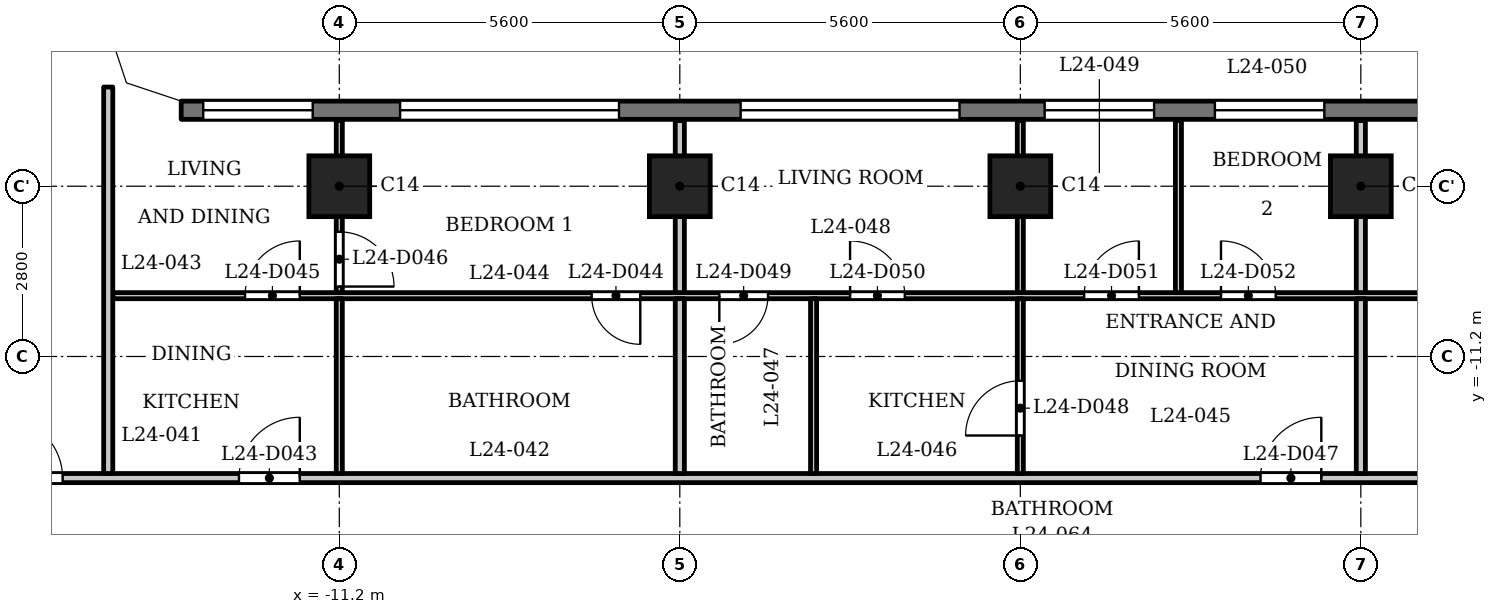
"""IFC4 building model, lengths in metres.
Left out: names, types, materials, properties, quantities, classifications, styles, units other than length and angle.
Written with IfcOpenShell. Run it as: python <this file> out.ifc"""

import sys

from ifc_helpers import new_model, si_unit, direction, frame, frame_2d, origin, origin_2d, place, context, subcontext, project, spatial, polyline, rectangle, outline, extrude, element, fill, save


model = new_model("IFC4")
c1 = context("Model", 3, precision=1e-05, world=origin(), true_north=direction((0.0, 1.0)))
c2 = subcontext(c1, "Body", "Model", "MODEL_VIEW")
j1 = project(units=[si_unit("LENGTHUNIT", "METRE"), si_unit("PLANEANGLEUNIT", "RADIAN")], contexts=[c1])
p1 = place(None, origin())
s1 = spatial("IfcSite", under=j1, at=p1, CompositionType="ELEMENT")
p2 = place(p1, origin())
s2 = spatial("IfcBuilding", under=s1, at=p2, CompositionType="ELEMENT")
p3 = place(p2, frame((0.0, 0.0, 97.3)))
s3 = spatial("IfcBuildingStorey", under=s2, at=p3, CompositionType="ELEMENT", Elevation=97.3)
for number, where, z_axis, x_axis in (
    (1, (-11.2, -8.4, 0.0), (0.0, 0.0, 1.0), (1.0, 0.0, 0.0)),
    (2, (-5.6, -8.4, 0.0), (0.0, 0.0, 1.0), (1.0, 0.0, 0.0)),
    (3, (0.0, -8.4, 0.0), (0.0, 0.0, 1.0), (1.0, 0.0, 0.0)),
    (4, (5.6, -8.4, 0.0), (0.0, 0.0, 1.0), (1.0, 0.0, 0.0)),
):
    element("IfcColumn", number, at=place(p3, frame(where, z_axis=z_axis, x_axis=x_axis)), inside=s3, PredefinedType="COLUMN", context=c2, shape_type="SweptSolid", body=[
        extrude(rectangle(XDim=1.0, YDim=1.0, at=origin_2d()), origin(), (0.0, 0.0, 1.0), 3.5),
    ])
p4 = place(p3, frame((13.8, -7.15, 0.0), z_axis=(0.0, 0.0, 1.0), x_axis=(-1.0, 0.0, 0.0)))
e5 = element("IfcWall", 5, at=p4, inside=s3, PredefinedType="SOLIDWALL", context=c2, shape_type="SweptSolid", body=[
    extrude(rectangle(XDim=27.6, YDim=0.3, at=frame_2d((13.8, 0.0))), origin(), (0.0, 0.0, 1.0), 3.2),
])
p5 = place(p4, frame((0.363, 0.0, 0.9)))
e6 = element("IfcOpeningElement", 6, at=p5, cuts=e5, PredefinedType="OPENING", context=c2, shape_type="SweptSolid", body=[
    extrude(rectangle(XDim=1.8, YDim=1.25, at=frame_2d((0.9, 0.625))), frame((0.0, 0.16, 0.0), z_axis=(0.0, -1.0, 0.0), x_axis=(1.0, 0.0, 0.0)), (0.0, 0.0, 1.0), 0.32),
])
p6 = place(p4, frame((3.6, 0.0, 1.2)))
e7 = element("IfcOpeningElement", 7, at=p6, cuts=e5, PredefinedType="OPENING", context=c2, shape_type="SweptSolid", body=[
    extrude(rectangle(XDim=3.6, YDim=0.95, at=frame_2d((1.8, 0.475))), frame((0.0, 0.16, 0.0), z_axis=(0.0, -1.0, 0.0), x_axis=(1.0, 0.0, 0.0)), (0.0, 0.0, 1.0), 0.32),
])
p7 = place(p4, frame((8.8, 0.0, 0.9)))
e8 = element("IfcOpeningElement", 8, at=p7, cuts=e5, PredefinedType="OPENING", context=c2, shape_type="SweptSolid", body=[
    extrude(rectangle(XDim=1.8, YDim=1.25, at=frame_2d((0.9, 0.625))), frame((0.0, 0.16, 0.0), z_axis=(0.0, -1.0, 0.0), x_axis=(1.0, 0.0, 0.0)), (0.0, 0.0, 1.0), 0.32),
])
p8 = place(p4, frame((11.6, 0.0, 0.9)))
e9 = element("IfcOpeningElement", 9, at=p8, cuts=e5, PredefinedType="OPENING", context=c2, shape_type="SweptSolid", body=[
    extrude(rectangle(XDim=1.8, YDim=1.25, at=frame_2d((0.9, 0.625))), frame((0.0, 0.16, 0.0), z_axis=(0.0, -1.0, 0.0), x_axis=(1.0, 0.0, 0.0)), (0.0, 0.0, 1.0), 0.32),
])
p9 = place(p4, frame((14.8, 0.0, 1.2)))
e10 = element("IfcOpeningElement", 10, at=p9, cuts=e5, PredefinedType="OPENING", context=c2, shape_type="SweptSolid", body=[
    extrude(rectangle(XDim=3.6, YDim=0.95, at=frame_2d((1.8, 0.475))), frame((0.0, 0.16, 0.0), z_axis=(0.0, -1.0, 0.0), x_axis=(1.0, 0.0, 0.0)), (0.0, 0.0, 1.0), 0.32),
])
p10 = place(p4, frame((20.4, 0.0, 1.2)))
e11 = element("IfcOpeningElement", 11, at=p10, cuts=e5, PredefinedType="OPENING", context=c2, shape_type="SweptSolid", body=[
    extrude(rectangle(XDim=3.6, YDim=0.95, at=frame_2d((1.8, 0.475))), frame((0.0, 0.16, 0.0), z_axis=(0.0, -1.0, 0.0), x_axis=(1.0, 0.0, 0.0)), (0.0, 0.0, 1.0), 0.32),
])
p11 = place(p4, frame((25.438, 0.0, 0.9)))
e12 = element("IfcOpeningElement", 12, at=p11, cuts=e5, PredefinedType="OPENING", context=c2, shape_type="SweptSolid", body=[
    extrude(rectangle(XDim=1.8, YDim=1.25, at=frame_2d((0.9, 0.625))), frame((0.0, 0.16, 0.0), z_axis=(0.0, -1.0, 0.0), x_axis=(1.0, 0.0, 0.0)), (0.0, 0.0, 1.0), 0.32),
])
p12 = place(p3, frame((-17.4, -13.2, 0.0), z_axis=(0.0, 0.0, 1.0), x_axis=(1.0, 0.0, 0.0)))
e13 = element("IfcWall", 13, at=p12, inside=s3, PredefinedType="PARTITIONING", context=c2, shape_type="SweptSolid", body=[
    extrude(rectangle(XDim=34.8, YDim=0.15, at=frame_2d((17.4, 0.0))), origin(), (0.0, 0.0, 1.0), 3.2),
])
p13 = place(p12, frame((0.65, 0.0, 0.0)))
e14 = element("IfcOpeningElement", 14, at=p13, cuts=e13, PredefinedType="OPENING", context=c2, shape_type="SweptSolid", body=[
    extrude(rectangle(XDim=1.0, YDim=2.1, at=frame_2d((0.5, 1.05))), frame((0.0, 0.085, 0.0), z_axis=(0.0, -1.0, 0.0), x_axis=(1.0, 0.0, 0.0)), (0.0, 0.0, 1.0), 0.17),
])
p14 = place(p12, frame((33.05, 0.0, 0.0)))
e15 = element("IfcOpeningElement", 15, at=p14, cuts=e13, PredefinedType="OPENING", context=c2, shape_type="SweptSolid", body=[
    extrude(rectangle(XDim=1.0, YDim=2.1, at=frame_2d((0.5, 1.05))), frame((0.0, 0.085, 0.0), z_axis=(0.0, -1.0, 0.0), x_axis=(1.0, 0.0, 0.0)), (0.0, 0.0, 1.0), 0.17),
])
p15 = place(p12, frame((4.55, 0.0, 0.0)))
e16 = element("IfcOpeningElement", 16, at=p15, cuts=e13, PredefinedType="OPENING", context=c2, shape_type="SweptSolid", body=[
    extrude(rectangle(XDim=1.0, YDim=2.1, at=frame_2d((0.5, 1.05))), frame((0.0, 0.085, 0.0), z_axis=(0.0, -1.0, 0.0), x_axis=(1.0, 0.0, 0.0)), (0.0, 0.0, 1.0), 0.17),
])
p16 = place(p12, frame((21.35, 0.0, 0.0)))
e17 = element("IfcOpeningElement", 17, at=p16, cuts=e13, PredefinedType="OPENING", context=c2, shape_type="SweptSolid", body=[
    extrude(rectangle(XDim=1.0, YDim=2.1, at=frame_2d((0.5, 1.05))), frame((0.0, 0.085, 0.0), z_axis=(0.0, -1.0, 0.0), x_axis=(1.0, 0.0, 0.0)), (0.0, 0.0, 1.0), 0.17),
])
p17 = place(p12, frame((30.75, 0.0, 0.0)))
e18 = element("IfcOpeningElement", 18, at=p17, cuts=e13, PredefinedType="OPENING", context=c2, shape_type="SweptSolid", body=[
    extrude(rectangle(XDim=1.0, YDim=2.1, at=frame_2d((0.5, 1.05))), frame((0.0, 0.085, 0.0), z_axis=(0.0, -1.0, 0.0), x_axis=(1.0, 0.0, 0.0)), (0.0, 0.0, 1.0), 0.17),
])
p18 = place(p3, frame((-14.925, -10.2, 0.0), z_axis=(0.0, 0.0, 1.0), x_axis=(1.0, 0.0, 0.0)))
e19 = element("IfcWall", 19, at=p18, inside=s3, PredefinedType="PARTITIONING", context=c2, shape_type="SweptSolid", body=[
    extrude(rectangle(XDim=29.85, YDim=0.1, at=frame_2d((14.925, 0.0))), origin(), (0.0, 0.0, 1.0), 3.2),
])
p19 = place(p18, frame((7.875, 0.0, 0.0)))
e20 = element("IfcOpeningElement", 20, at=p19, cuts=e19, PredefinedType="OPENING", context=c2, shape_type="SweptSolid", body=[
    extrude(rectangle(XDim=0.8, YDim=2.1, at=frame_2d((0.4, 1.05))), frame((0.0, 0.06, 0.0), z_axis=(0.0, -1.0, 0.0), x_axis=(1.0, 0.0, 0.0)), (0.0, 0.0, 1.0), 0.12),
])
p20 = place(p18, frame((2.175, 0.0, 0.0)))
e21 = element("IfcOpeningElement", 21, at=p20, cuts=e19, PredefinedType="OPENING", context=c2, shape_type="SweptSolid", body=[
    extrude(rectangle(XDim=0.9, YDim=2.1, at=frame_2d((0.45, 1.05))), frame((0.0, 0.06, 0.0), z_axis=(0.0, -1.0, 0.0), x_axis=(1.0, 0.0, 0.0)), (0.0, 0.0, 1.0), 0.12),
])
p21 = place(p18, frame((9.975, 0.0, 0.0)))
e22 = element("IfcOpeningElement", 22, at=p21, cuts=e19, PredefinedType="OPENING", context=c2, shape_type="SweptSolid", body=[
    extrude(rectangle(XDim=0.8, YDim=2.1, at=frame_2d((0.4, 1.05))), frame((0.0, 0.06, 0.0), z_axis=(0.0, -1.0, 0.0), x_axis=(1.0, 0.0, 0.0)), (0.0, 0.0, 1.0), 0.12),
])
p22 = place(p18, frame((12.125, 0.0, 0.0)))
e23 = element("IfcOpeningElement", 23, at=p22, cuts=e19, PredefinedType="OPENING", context=c2, shape_type="SweptSolid", body=[
    extrude(rectangle(XDim=0.9, YDim=2.1, at=frame_2d((0.45, 1.05))), frame((0.0, 0.06, 0.0), z_axis=(0.0, -1.0, 0.0), x_axis=(1.0, 0.0, 0.0)), (0.0, 0.0, 1.0), 0.12),
])
p23 = place(p18, frame((15.975, 0.0, 0.0)))
e24 = element("IfcOpeningElement", 24, at=p23, cuts=e19, PredefinedType="OPENING", context=c2, shape_type="SweptSolid", body=[
    extrude(rectangle(XDim=0.9, YDim=2.1, at=frame_2d((0.45, 1.05))), frame((0.0, 0.06, 0.0), z_axis=(0.0, -1.0, 0.0), x_axis=(1.0, 0.0, 0.0)), (0.0, 0.0, 1.0), 0.12),
])
p24 = place(p18, frame((18.225, 0.0, 0.0)))
e25 = element("IfcOpeningElement", 25, at=p24, cuts=e19, PredefinedType="OPENING", context=c2, shape_type="SweptSolid", body=[
    extrude(rectangle(XDim=0.9, YDim=2.1, at=frame_2d((0.45, 1.05))), frame((0.0, 0.06, 0.0), z_axis=(0.0, -1.0, 0.0), x_axis=(1.0, 0.0, 0.0)), (0.0, 0.0, 1.0), 0.12),
])
p25 = place(p18, frame((24.675, 0.0, 0.0)))
e26 = element("IfcOpeningElement", 26, at=p25, cuts=e19, PredefinedType="OPENING", context=c2, shape_type="SweptSolid", body=[
    extrude(rectangle(XDim=0.8, YDim=2.1, at=frame_2d((0.4, 1.05))), frame((0.0, 0.06, 0.0), z_axis=(0.0, -1.0, 0.0), x_axis=(1.0, 0.0, 0.0)), (0.0, 0.0, 1.0), 0.12),
])
p26 = place(p18, frame((28.375, 0.0, 0.0)))
e27 = element("IfcOpeningElement", 27, at=p26, cuts=e19, PredefinedType="OPENING", context=c2, shape_type="SweptSolid", body=[
    extrude(rectangle(XDim=0.9, YDim=2.1, at=frame_2d((0.45, 1.05))), frame((0.0, 0.06, 0.0), z_axis=(0.0, -1.0, 0.0), x_axis=(1.0, 0.0, 0.0)), (0.0, 0.0, 1.0), 0.12),
])
p27 = place(p3, frame((-15.0, -13.125, 0.0), z_axis=(0.0, 0.0, 1.0), x_axis=(0.0, 1.0, 0.0)))
e28 = element("IfcWall", 28, at=p27, inside=s3, PredefinedType="PARTITIONING", context=c2, shape_type="SweptSolid", body=[
    extrude(rectangle(XDim=6.356, YDim=0.15, at=frame_2d((3.178, 0.0))), origin(), (0.0, 0.0, 1.0), 3.2),
])
p28 = place(p3, frame((-11.2, -13.125, 0.0), z_axis=(0.0, 0.0, 1.0), x_axis=(0.0, 1.0, 0.0)))
e29 = element("IfcWall", 29, at=p28, inside=s3, PredefinedType="PARTITIONING", context=c2, shape_type="SweptSolid", body=[
    extrude(rectangle(XDim=2.875, YDim=0.1, at=frame_2d((1.438, 0.0))), origin(), (0.0, 0.0, 1.0), 3.2),
])
p29 = place(p3, frame((-11.2, -10.15, 0.0), z_axis=(0.0, 0.0, 1.0), x_axis=(0.0, 1.0, 0.0)))
e30 = element("IfcWall", 30, at=p29, inside=s3, PredefinedType="PARTITIONING", context=c2, shape_type="SweptSolid", body=[
    extrude(rectangle(XDim=2.83, YDim=0.1, at=frame_2d((1.415, 0.0))), origin(), (0.0, 0.0, 1.0), 3.2),
])
p30 = place(p29, frame((0.1, 0.0, 0.0)))
e31 = element("IfcOpeningElement", 31, at=p30, cuts=e30, PredefinedType="OPENING", context=c2, shape_type="SweptSolid", body=[
    extrude(rectangle(XDim=0.9, YDim=2.1, at=frame_2d((0.45, 1.05))), frame((0.0, 0.06, 0.0), z_axis=(0.0, -1.0, 0.0), x_axis=(1.0, 0.0, 0.0)), (0.0, 0.0, 1.0), 0.12),
])
p31 = place(p3, frame((-5.6, -13.125, 0.0), z_axis=(0.0, 0.0, 1.0), x_axis=(0.0, 1.0, 0.0)))
e32 = element("IfcWall", 32, at=p31, inside=s3, PredefinedType="PARTITIONING", context=c2, shape_type="SweptSolid", body=[
    extrude(rectangle(XDim=2.875, YDim=0.15, at=frame_2d((1.438, 0.0))), origin(), (0.0, 0.0, 1.0), 3.2),
])
p32 = place(p3, frame((-5.6, -10.15, 0.0), z_axis=(0.0, 0.0, 1.0), x_axis=(0.0, 1.0, 0.0)))
e33 = element("IfcWall", 33, at=p32, inside=s3, PredefinedType="PARTITIONING", context=c2, shape_type="SweptSolid", body=[
    extrude(rectangle(XDim=2.83, YDim=0.15, at=frame_2d((1.415, 0.0))), origin(), (0.0, 0.0, 1.0), 3.2),
])
p33 = place(p3, frame((-3.4, -13.125, 0.0), z_axis=(0.0, 0.0, 1.0), x_axis=(0.0, 1.0, 0.0)))
e34 = element("IfcWall", 34, at=p33, inside=s3, PredefinedType="PARTITIONING", context=c2, shape_type="SweptSolid", body=[
    extrude(rectangle(XDim=2.875, YDim=0.1, at=frame_2d((1.438, 0.0))), origin(), (0.0, 0.0, 1.0), 3.2),
])
p34 = place(p3, frame((0.0, -13.125, 0.0), z_axis=(0.0, 0.0, 1.0), x_axis=(0.0, 1.0, 0.0)))
e35 = element("IfcWall", 35, at=p34, inside=s3, PredefinedType="PARTITIONING", context=c2, shape_type="SweptSolid", body=[
    extrude(rectangle(XDim=2.875, YDim=0.1, at=frame_2d((1.438, 0.0))), origin(), (0.0, 0.0, 1.0), 3.2),
])
p35 = place(p34, frame((0.625, 0.0, 0.0)))
e36 = element("IfcOpeningElement", 36, at=p35, cuts=e35, PredefinedType="OPENING", context=c2, shape_type="SweptSolid", body=[
    extrude(rectangle(XDim=0.9, YDim=2.1, at=frame_2d((0.45, 1.05))), frame((0.0, 0.06, 0.0), z_axis=(0.0, -1.0, 0.0), x_axis=(1.0, 0.0, 0.0)), (0.0, 0.0, 1.0), 0.12),
])
for number, where, z_axis, x_axis in (
    (37, (0.0, -10.15, 0.0), (0.0, 0.0, 1.0), (0.0, 1.0, 0.0)),
    (38, (2.6, -10.15, 0.0), (0.0, 0.0, 1.0), (0.0, 1.0, 0.0)),
):
    element("IfcWall", number, at=place(p3, frame(where, z_axis=z_axis, x_axis=x_axis)), inside=s3, PredefinedType="PARTITIONING", context=c2, shape_type="SweptSolid", body=[
        extrude(rectangle(XDim=2.83, YDim=0.1, at=frame_2d((1.415, 0.0))), origin(), (0.0, 0.0, 1.0), 3.2),
    ])
p36 = place(p3, frame((5.6, -13.125, 0.0), z_axis=(0.0, 0.0, 1.0), x_axis=(0.0, 1.0, 0.0)))
e39 = element("IfcWall", 39, at=p36, inside=s3, PredefinedType="PARTITIONING", context=c2, shape_type="SweptSolid", body=[
    extrude(rectangle(XDim=2.875, YDim=0.15, at=frame_2d((1.438, 0.0))), origin(), (0.0, 0.0, 1.0), 3.2),
])
p37 = place(p3, frame((5.6, -10.15, 0.0), z_axis=(0.0, 0.0, 1.0), x_axis=(0.0, 1.0, 0.0)))
e40 = element("IfcWall", 40, at=p37, inside=s3, PredefinedType="PARTITIONING", context=c2, shape_type="SweptSolid", body=[
    extrude(rectangle(XDim=2.83, YDim=0.15, at=frame_2d((1.415, 0.0))), origin(), (0.0, 0.0, 1.0), 3.2),
])
p38 = place(p3, origin())
e41 = element("IfcWall", 41, at=p38, inside=s3, PredefinedType="SOLIDWALL", context=c2, shape_type="SweptSolid", body=[
    extrude(outline(polyline([(-14.937, -6.937), (-13.849, -7.3), (-13.8, -7.3), (-13.8, -7.0), (-14.7, -6.7), (-15.0, -5.8), (-15.3, -5.8), (-15.3, -5.849), (-14.937, -6.937)])), origin(), (0.0, 0.0, 1.0), 3.2),
])
p39 = place(p13, origin())
e42 = element("IfcDoor", 42, at=p39, inside=s3, OperationType="SINGLE_SWING_RIGHT", PredefinedType="DOOR", context=c2, shape_type="SweptSolid", body=[
    extrude(rectangle(XDim=1.0, YDim=2.1, at=frame_2d((0.5, 1.05))), frame((0.0, 0.025, 0.0), z_axis=(0.0, -1.0, 0.0), x_axis=(1.0, 0.0, 0.0)), (0.0, 0.0, 1.0), 0.05),
])
fill(e14, e42)
p40 = place(p15, origin())
e43 = element("IfcDoor", 43, at=p40, inside=s3, OperationType="SINGLE_SWING_LEFT", PredefinedType="DOOR", context=c2, shape_type="SweptSolid", body=[
    extrude(rectangle(XDim=1.0, YDim=2.1, at=frame_2d((0.5, 1.05))), frame((0.0, 0.025, 0.0), z_axis=(0.0, -1.0, 0.0), x_axis=(1.0, 0.0, 0.0)), (0.0, 0.0, 1.0), 0.05),
])
fill(e16, e43)
p41 = place(p19, origin())
e44 = element("IfcDoor", 44, at=p41, inside=s3, OperationType="SINGLE_SWING_RIGHT", PredefinedType="DOOR", context=c2, shape_type="SweptSolid", body=[
    extrude(rectangle(XDim=0.8, YDim=2.1, at=frame_2d((0.4, 1.05))), frame((0.0, 0.025, 0.0), z_axis=(0.0, -1.0, 0.0), x_axis=(1.0, 0.0, 0.0)), (0.0, 0.0, 1.0), 0.05),
])
fill(e20, e44)
p42 = place(p20, origin())
e45 = element("IfcDoor", 45, at=p42, inside=s3, OperationType="SINGLE_SWING_LEFT", PredefinedType="DOOR", context=c2, shape_type="SweptSolid", body=[
    extrude(rectangle(XDim=0.9, YDim=2.1, at=frame_2d((0.45, 1.05))), frame((0.0, 0.025, 0.0), z_axis=(0.0, -1.0, 0.0), x_axis=(1.0, 0.0, 0.0)), (0.0, 0.0, 1.0), 0.05),
])
fill(e21, e45)
p43 = place(p30, origin())
e46 = element("IfcDoor", 46, at=p43, inside=s3, OperationType="SINGLE_SWING_LEFT", PredefinedType="DOOR", context=c2, shape_type="SweptSolid", body=[
    extrude(rectangle(XDim=0.9, YDim=2.1, at=frame_2d((0.45, 1.05))), frame((0.0, 0.025, 0.0), z_axis=(0.0, -1.0, 0.0), x_axis=(1.0, 0.0, 0.0)), (0.0, 0.0, 1.0), 0.05),
])
fill(e31, e46)
p44 = place(p16, origin())
e47 = element("IfcDoor", 47, at=p44, inside=s3, OperationType="SINGLE_SWING_LEFT", PredefinedType="DOOR", context=c2, shape_type="SweptSolid", body=[
    extrude(rectangle(XDim=1.0, YDim=2.1, at=frame_2d((0.5, 1.05))), frame((0.0, 0.025, 0.0), z_axis=(0.0, -1.0, 0.0), x_axis=(1.0, 0.0, 0.0)), (0.0, 0.0, 1.0), 0.05),
])
fill(e17, e47)
p45 = place(p35, origin())
e48 = element("IfcDoor", 48, at=p45, inside=s3, OperationType="SINGLE_SWING_RIGHT", PredefinedType="DOOR", context=c2, shape_type="SweptSolid", body=[
    extrude(rectangle(XDim=0.9, YDim=2.1, at=frame_2d((0.45, 1.05))), frame((0.0, 0.025, 0.0), z_axis=(0.0, -1.0, 0.0), x_axis=(1.0, 0.0, 0.0)), (0.0, 0.0, 1.0), 0.05),
])
fill(e36, e48)
p46 = place(p21, origin())
e49 = element("IfcDoor", 49, at=p46, inside=s3, OperationType="SINGLE_SWING_LEFT", PredefinedType="DOOR", context=c2, shape_type="SweptSolid", body=[
    extrude(rectangle(XDim=0.8, YDim=2.1, at=frame_2d((0.4, 1.05))), frame((0.0, 0.025, 0.0), z_axis=(0.0, -1.0, 0.0), x_axis=(1.0, 0.0, 0.0)), (0.0, 0.0, 1.0), 0.05),
])
fill(e22, e49)
p47 = place(p22, origin())
e50 = element("IfcDoor", 50, at=p47, inside=s3, OperationType="SINGLE_SWING_RIGHT", PredefinedType="DOOR", context=c2, shape_type="SweptSolid", body=[
    extrude(rectangle(XDim=0.9, YDim=2.1, at=frame_2d((0.45, 1.05))), frame((0.0, 0.025, 0.0), z_axis=(0.0, -1.0, 0.0), x_axis=(1.0, 0.0, 0.0)), (0.0, 0.0, 1.0), 0.05),
])
fill(e23, e50)
p48 = place(p23, origin())
e51 = element("IfcDoor", 51, at=p48, inside=s3, OperationType="SINGLE_SWING_LEFT", PredefinedType="DOOR", context=c2, shape_type="SweptSolid", body=[
    extrude(rectangle(XDim=0.9, YDim=2.1, at=frame_2d((0.45, 1.05))), frame((0.0, 0.025, 0.0), z_axis=(0.0, -1.0, 0.0), x_axis=(1.0, 0.0, 0.0)), (0.0, 0.0, 1.0), 0.05),
])
fill(e24, e51)
p49 = place(p24, origin())
e52 = element("IfcDoor", 52, at=p49, inside=s3, OperationType="SINGLE_SWING_RIGHT", PredefinedType="DOOR", context=c2, shape_type="SweptSolid", body=[
    extrude(rectangle(XDim=0.9, YDim=2.1, at=frame_2d((0.45, 1.05))), frame((0.0, 0.025, 0.0), z_axis=(0.0, -1.0, 0.0), x_axis=(1.0, 0.0, 0.0)), (0.0, 0.0, 1.0), 0.05),
])
fill(e25, e52)
p50 = place(p7, origin())
e53 = element("IfcWindow", 53, at=p50, inside=s3, PartitioningType="SINGLE_PANEL", PredefinedType="WINDOW", context=c2, shape_type="SweptSolid", body=[
    extrude(rectangle(XDim=1.8, YDim=1.25, at=frame_2d((0.9, 0.625))), frame((0.0, 0.03, 0.0), z_axis=(0.0, -1.0, 0.0), x_axis=(1.0, 0.0, 0.0)), (0.0, 0.0, 1.0), 0.06),
])
fill(e8, e53)
p51 = place(p8, origin())
e54 = element("IfcWindow", 54, at=p51, inside=s3, PartitioningType="SINGLE_PANEL", PredefinedType="WINDOW", context=c2, shape_type="SweptSolid", body=[
    extrude(rectangle(XDim=1.8, YDim=1.25, at=frame_2d((0.9, 0.625))), frame((0.0, 0.03, 0.0), z_axis=(0.0, -1.0, 0.0), x_axis=(1.0, 0.0, 0.0)), (0.0, 0.0, 1.0), 0.06),
])
fill(e9, e54)
p52 = place(p9, origin())
e55 = element("IfcWindow", 55, at=p52, inside=s3, PartitioningType="SINGLE_PANEL", PredefinedType="WINDOW", context=c2, shape_type="SweptSolid", body=[
    extrude(rectangle(XDim=3.6, YDim=0.95, at=frame_2d((1.8, 0.475))), frame((0.0, 0.03, 0.0), z_axis=(0.0, -1.0, 0.0), x_axis=(1.0, 0.0, 0.0)), (0.0, 0.0, 1.0), 0.06),
])
fill(e10, e55)
p53 = place(p10, origin())
e56 = element("IfcWindow", 56, at=p53, inside=s3, PartitioningType="SINGLE_PANEL", PredefinedType="WINDOW", context=c2, shape_type="SweptSolid", body=[
    extrude(rectangle(XDim=3.6, YDim=0.95, at=frame_2d((1.8, 0.475))), frame((0.0, 0.03, 0.0), z_axis=(0.0, -1.0, 0.0), x_axis=(1.0, 0.0, 0.0)), (0.0, 0.0, 1.0), 0.06),
])
fill(e11, e56)
p54 = place(p11, origin())
e57 = element("IfcWindow", 57, at=p54, inside=s3, PartitioningType="SINGLE_PANEL", PredefinedType="WINDOW", context=c2, shape_type="SweptSolid", body=[
    extrude(rectangle(XDim=1.8, YDim=1.25, at=frame_2d((0.9, 0.625))), frame((0.0, 0.03, 0.0), z_axis=(0.0, -1.0, 0.0), x_axis=(1.0, 0.0, 0.0)), (0.0, 0.0, 1.0), 0.06),
])
fill(e12, e57)
save(model, sys.argv[1])
